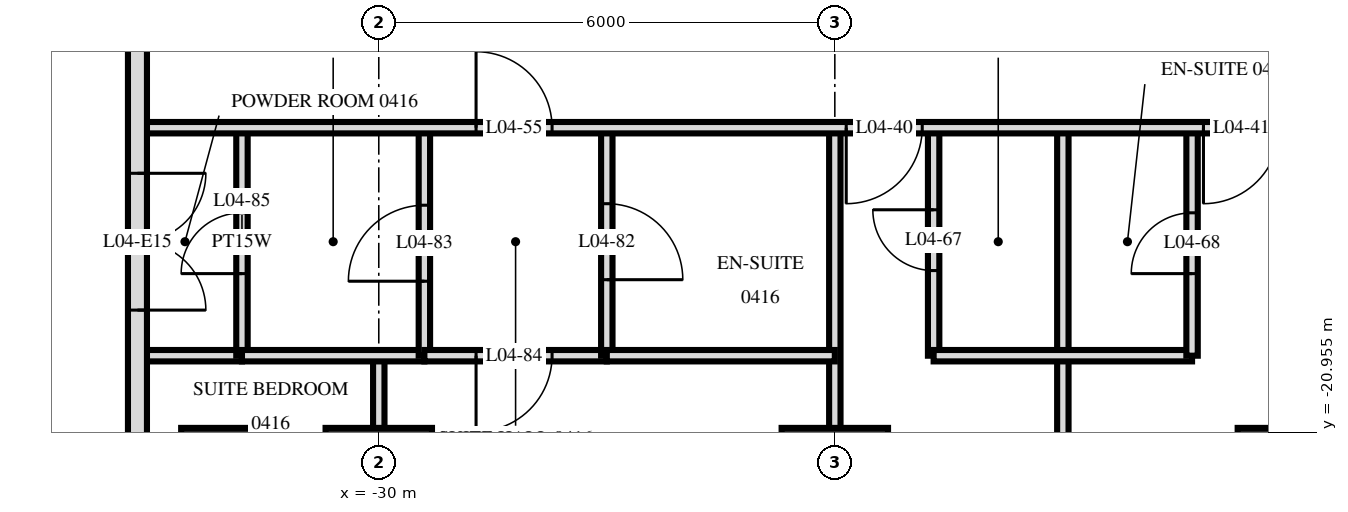
"""IFC4 building model, lengths in metres.
Left out: names, types, materials, properties, quantities, classifications, styles, units other than length and angle.
Written with IfcOpenShell. Run it as: python <this file> out.ifc"""

import sys

from ifc_helpers import new_model, si_unit, direction, frame, frame_2d, origin, origin_2d, place, context, subcontext, project, spatial, rectangle, extrude, element, fill, save


model = new_model("IFC4")
c1 = context("Model", 3, precision=1e-05, world=origin(), true_north=direction((0.0, 1.0)))
c2 = subcontext(c1, "Body", "Model", "MODEL_VIEW")
j1 = project(units=[si_unit("LENGTHUNIT", "METRE"), si_unit("PLANEANGLEUNIT", "RADIAN")], contexts=[c1])
p1 = place(None, origin())
s1 = spatial("IfcSite", under=j1, at=p1, CompositionType="ELEMENT")
p2 = place(p1, origin())
s2 = spatial("IfcBuilding", under=s1, at=p2, CompositionType="ELEMENT")
p3 = place(p2, frame((0.0, 0.0, 24.0)))
s3 = spatial("IfcBuildingStorey", under=s2, at=p3, CompositionType="ELEMENT", Elevation=24.0)
p4 = place(p3, frame((-32.1, -21.6, -0.28), z_axis=(0.0, 0.0, 1.0), x_axis=(0.0, 1.0, 0.0)))
e1 = element("IfcColumn", 1, at=p4, inside=s3, PredefinedType="COLUMN", context=c2, shape_type="SweptSolid", body=[
    extrude(rectangle(XDim=1.4, YDim=1.0, at=origin_2d()), origin(), (0.0, 0.0, 1.0), 3.88),
])
for number, where, z_axis, x_axis in (
    (2, (-30.0, -21.6, -0.28), (0.0, 0.0, 1.0), (1.0, 0.0, 0.0)),
    (3, (-24.0, -21.6, -0.28), (0.0, 0.0, 1.0), (1.0, 0.0, 0.0)),
    (4, (-18.0, -21.6, -0.28), (0.0, 0.0, 1.0), (1.0, 0.0, 0.0)),
):
    element("IfcColumn", number, at=place(p3, frame(where, z_axis=z_axis, x_axis=x_axis)), inside=s3, PredefinedType="COLUMN", context=c2, shape_type="SweptSolid", body=[
        extrude(rectangle(XDim=1.4, YDim=1.4, at=origin_2d()), origin(), (0.0, 0.0, 1.0), 3.88),
    ])
p5 = place(p3, frame((-33.175, -3.325, 0.0), z_axis=(0.0, 0.0, 1.0), x_axis=(0.0, -1.0, 0.0)))
e5 = element("IfcWall", 5, at=p5, inside=s3, PredefinedType="SOLIDWALL", context=c2, shape_type="SweptSolid", body=[
    extrude(rectangle(XDim=21.551, YDim=0.25, at=frame_2d((10.775, 0.0))), origin(), (0.0, 0.0, 1.0), 3.32),
])
p6 = place(p5, frame((7.025, 0.0, 0.0)))
e6 = element("IfcOpeningElement", 6, at=p6, cuts=e5, PredefinedType="OPENING", context=c2, shape_type="SweptSolid", body=[
    extrude(rectangle(XDim=1.8, YDim=2.4, at=frame_2d((0.9, 1.2))), frame((0.0, 0.135, 0.0), z_axis=(0.0, -1.0, 0.0), x_axis=(1.0, 0.0, 0.0)), (0.0, 0.0, 1.0), 0.27),
])
p7 = place(p5, frame((14.225, 0.0, 0.0)))
e7 = element("IfcOpeningElement", 7, at=p7, cuts=e5, PredefinedType="OPENING", context=c2, shape_type="SweptSolid", body=[
    extrude(rectangle(XDim=1.8, YDim=2.4, at=frame_2d((0.9, 1.2))), frame((0.0, 0.135, 0.0), z_axis=(0.0, -1.0, 0.0), x_axis=(1.0, 0.0, 0.0)), (0.0, 0.0, 1.0), 0.27),
])
p8 = place(p5, frame((18.875, 0.0, 0.0)))
e8 = element("IfcOpeningElement", 8, at=p8, cuts=e5, PredefinedType="OPENING", context=c2, shape_type="SweptSolid", body=[
    extrude(rectangle(XDim=1.8, YDim=2.4, at=frame_2d((0.9, 1.2))), frame((0.0, 0.135, 0.0), z_axis=(0.0, -1.0, 0.0), x_axis=(1.0, 0.0, 0.0)), (0.0, 0.0, 1.0), 0.27),
])
p9 = place(p3, frame((-19.3, -19.95, 0.0), z_axis=(0.0, 0.0, 1.0), x_axis=(0.0, 1.0, 0.0)))
e9 = element("IfcWall", 9, at=p9, inside=s3, PredefinedType="PARTITIONING", context=c2, shape_type="SweptSolid", body=[
    extrude(rectangle(XDim=3.0, YDim=0.15, at=frame_2d((1.5, 0.0))), origin(), (0.0, 0.0, 1.0), 3.32),
])
p10 = place(p9, frame((1.08, 0.0, 0.0)))
e10 = element("IfcOpeningElement", 10, at=p10, cuts=e9, PredefinedType="OPENING", context=c2, shape_type="SweptSolid", body=[
    extrude(rectangle(XDim=0.8, YDim=2.1, at=frame_2d((0.4, 1.05))), frame((0.0, 0.085, 0.0), z_axis=(0.0, -1.0, 0.0), x_axis=(1.0, 0.0, 0.0)), (0.0, 0.0, 1.0), 0.17),
])
p11 = place(p3, frame((-21.0, -29.22, 0.0), z_axis=(0.0, 0.0, 1.0), x_axis=(0.0, 1.0, 0.0)))
e11 = element("IfcWall", 11, at=p11, inside=s3, PredefinedType="PARTITIONING", context=c2, shape_type="SweptSolid", body=[
    extrude(rectangle(XDim=12.27, YDim=0.15, at=frame_2d((6.135, 0.0))), origin(), (0.0, 0.0, 1.0), 3.32),
])
p12 = place(p3, frame((-22.7, -19.95, 0.0), z_axis=(0.0, 0.0, 1.0), x_axis=(0.0, 1.0, 0.0)))
e12 = element("IfcWall", 12, at=p12, inside=s3, PredefinedType="PARTITIONING", context=c2, shape_type="SweptSolid", body=[
    extrude(rectangle(XDim=3.0, YDim=0.15, at=frame_2d((1.5, 0.0))), origin(), (0.0, 0.0, 1.0), 3.32),
])
p13 = place(p12, frame((1.12, 0.0, 0.0)))
e13 = element("IfcOpeningElement", 13, at=p13, cuts=e12, PredefinedType="OPENING", context=c2, shape_type="SweptSolid", body=[
    extrude(rectangle(XDim=0.8, YDim=2.1, at=frame_2d((0.4, 1.05))), frame((0.0, 0.085, 0.0), z_axis=(0.0, -1.0, 0.0), x_axis=(1.0, 0.0, 0.0)), (0.0, 0.0, 1.0), 0.17),
])
p14 = place(p3, frame((-24.0, -29.22, 0.0), z_axis=(0.0, 0.0, 1.0), x_axis=(0.0, 1.0, 0.0)))
e14 = element("IfcWall", 14, at=p14, inside=s3, PredefinedType="PARTITIONING", context=c2, shape_type="SweptSolid", body=[
    extrude(rectangle(XDim=12.27, YDim=0.15, at=frame_2d((6.135, 0.0))), origin(), (0.0, 0.0, 1.0), 3.32),
])
p15 = place(p3, frame((-27.0, -19.95, 0.0), z_axis=(0.0, 0.0, 1.0), x_axis=(0.0, 1.0, 0.0)))
e15 = element("IfcWall", 15, at=p15, inside=s3, PredefinedType="PARTITIONING", context=c2, shape_type="SweptSolid", body=[
    extrude(rectangle(XDim=3.0, YDim=0.15, at=frame_2d((1.5, 0.0))), origin(), (0.0, 0.0, 1.0), 3.32),
])
p16 = place(p15, frame((1.0, 0.0, 0.0)))
e16 = element("IfcOpeningElement", 16, at=p16, cuts=e15, PredefinedType="OPENING", context=c2, shape_type="SweptSolid", body=[
    extrude(rectangle(XDim=1.0, YDim=2.1, at=frame_2d((0.5, 1.05))), frame((0.0, 0.085, 0.0), z_axis=(0.0, -1.0, 0.0), x_axis=(1.0, 0.0, 0.0)), (0.0, 0.0, 1.0), 0.17),
])
p17 = place(p3, frame((-29.4, -19.95, 0.0), z_axis=(0.0, 0.0, 1.0), x_axis=(0.0, 1.0, 0.0)))
e17 = element("IfcWall", 17, at=p17, inside=s3, PredefinedType="PARTITIONING", context=c2, shape_type="SweptSolid", body=[
    extrude(rectangle(XDim=3.0, YDim=0.15, at=frame_2d((1.5, 0.0))), origin(), (0.0, 0.0, 1.0), 3.32),
])
p18 = place(p17, frame((0.98, 0.0, 0.0)))
e18 = element("IfcOpeningElement", 18, at=p18, cuts=e17, PredefinedType="OPENING", context=c2, shape_type="SweptSolid", body=[
    extrude(rectangle(XDim=1.0, YDim=2.1, at=frame_2d((0.5, 1.05))), frame((0.0, 0.085, 0.0), z_axis=(0.0, -1.0, 0.0), x_axis=(1.0, 0.0, 0.0)), (0.0, 0.0, 1.0), 0.17),
])
p19 = place(p3, frame((-30.0, -28.978, 0.0), z_axis=(0.0, 0.0, 1.0), x_axis=(0.0, 1.0, 0.0)))
e19 = element("IfcWall", 19, at=p19, inside=s3, PredefinedType="PARTITIONING", context=c2, shape_type="SweptSolid", body=[
    extrude(rectangle(XDim=9.028, YDim=0.15, at=frame_2d((4.514, 0.0))), origin(), (0.0, 0.0, 1.0), 3.32),
])
p20 = place(p19, frame((3.987, 0.0, 0.0)))
e20 = element("IfcOpeningElement", 20, at=p20, cuts=e19, PredefinedType="OPENING", context=c2, shape_type="SweptSolid", body=[
    extrude(rectangle(XDim=0.9, YDim=2.1, at=frame_2d((0.45, 1.05))), frame((0.0, 0.085, 0.0), z_axis=(0.0, -1.0, 0.0), x_axis=(1.0, 0.0, 0.0)), (0.0, 0.0, 1.0), 0.17),
])
p21 = place(p3, frame((-31.8, -19.95, 0.0), z_axis=(0.0, 0.0, 1.0), x_axis=(0.0, 1.0, 0.0)))
e21 = element("IfcWall", 21, at=p21, inside=s3, PredefinedType="PLUMBINGWALL", context=c2, shape_type="SweptSolid", body=[
    extrude(rectangle(XDim=3.0, YDim=0.15, at=frame_2d((1.5, 0.0))), origin(), (0.0, 0.0, 1.0), 3.32),
])
p22 = place(p21, frame((1.08, 0.0, 0.0)))
e22 = element("IfcOpeningElement", 22, at=p22, cuts=e21, PredefinedType="OPENING", context=c2, shape_type="SweptSolid", body=[
    extrude(rectangle(XDim=0.8, YDim=2.1, at=frame_2d((0.4, 1.05))), frame((0.0, 0.085, 0.0), z_axis=(0.0, -1.0, 0.0), x_axis=(1.0, 0.0, 0.0)), (0.0, 0.0, 1.0), 0.17),
])
p23 = place(p3, frame((-29.4, -19.95, 0.0), z_axis=(0.0, 0.0, 1.0), x_axis=(1.0, 0.0, 0.0)))
e23 = element("IfcWall", 23, at=p23, inside=s3, PredefinedType="PARTITIONING", context=c2, shape_type="SweptSolid", body=[
    extrude(rectangle(XDim=2.4, YDim=0.15, at=frame_2d((1.2, 0.0))), origin(), (0.0, 0.0, 1.0), 3.32),
])
p24 = place(p23, frame((0.68, 0.0, 0.0)))
e24 = element("IfcOpeningElement", 24, at=p24, cuts=e23, PredefinedType="OPENING", context=c2, shape_type="SweptSolid", body=[
    extrude(rectangle(XDim=1.0, YDim=2.1, at=frame_2d((0.5, 1.05))), frame((0.0, 0.085, 0.0), z_axis=(0.0, -1.0, 0.0), x_axis=(1.0, 0.0, 0.0)), (0.0, 0.0, 1.0), 0.17),
])
p25 = place(p3, frame((-31.8, -19.95, 0.0), z_axis=(0.0, 0.0, 1.0), x_axis=(1.0, 0.0, 0.0)))
e25 = element("IfcWall", 25, at=p25, inside=s3, PredefinedType="PARTITIONING", context=c2, shape_type="SweptSolid", body=[
    extrude(rectangle(XDim=2.4, YDim=0.15, at=frame_2d((1.2, 0.0))), origin(), (0.0, 0.0, 1.0), 3.32),
])
p26 = place(p3, frame((-27.0, -19.95, 0.0), z_axis=(0.0, 0.0, 1.0), x_axis=(1.0, 0.0, 0.0)))
e26 = element("IfcWall", 26, at=p26, inside=s3, PredefinedType="PARTITIONING", context=c2, shape_type="SweptSolid", body=[
    extrude(rectangle(XDim=3.0, YDim=0.15, at=frame_2d((1.5, 0.0))), origin(), (0.0, 0.0, 1.0), 3.32),
])
p27 = place(p3, frame((-22.7, -19.95, 0.0), z_axis=(0.0, 0.0, 1.0), x_axis=(1.0, 0.0, 0.0)))
e27 = element("IfcWall", 27, at=p27, inside=s3, PredefinedType="PARTITIONING", context=c2, shape_type="SweptSolid", body=[
    extrude(rectangle(XDim=3.4, YDim=0.15, at=frame_2d((1.7, 0.0))), origin(), (0.0, 0.0, 1.0), 3.32),
])
p28 = place(p3, frame((-33.12, -19.95, 0.0), z_axis=(0.0, 0.0, 1.0), x_axis=(1.0, 0.0, 0.0)))
e28 = element("IfcWall", 28, at=p28, inside=s3, PredefinedType="PLUMBINGWALL", context=c2, shape_type="SweptSolid", body=[
    extrude(rectangle(XDim=1.32, YDim=0.15, at=frame_2d((0.66, 0.0))), origin(), (0.0, 0.0, 1.0), 3.32),
])
p29 = place(p3, frame((-33.12, -16.95, 0.0), z_axis=(0.0, 0.0, 1.0), x_axis=(1.0, 0.0, 0.0)))
e29 = element("IfcWall", 29, at=p29, inside=s3, PredefinedType="PARTITIONING", context=c2, shape_type="SweptSolid", body=[
    extrude(rectangle(XDim=66.24, YDim=0.15, at=frame_2d((33.12, 0.0))), origin(), (0.0, 0.0, 1.0), 3.32),
])
p30 = place(p29, frame((9.27, 0.0, 0.0)))
e30 = element("IfcOpeningElement", 30, at=p30, cuts=e29, PredefinedType="OPENING", context=c2, shape_type="SweptSolid", body=[
    extrude(rectangle(XDim=1.0, YDim=2.1, at=frame_2d((0.5, 1.05))), frame((0.0, 0.085, 0.0), z_axis=(0.0, -1.0, 0.0), x_axis=(1.0, 0.0, 0.0)), (0.0, 0.0, 1.0), 0.17),
])
p31 = place(p29, frame((13.97, 0.0, 0.0)))
e31 = element("IfcOpeningElement", 31, at=p31, cuts=e29, PredefinedType="OPENING", context=c2, shape_type="SweptSolid", body=[
    extrude(rectangle(XDim=1.0, YDim=2.1, at=frame_2d((0.5, 1.05))), frame((0.0, 0.085, 0.0), z_axis=(0.0, -1.0, 0.0), x_axis=(1.0, 0.0, 0.0)), (0.0, 0.0, 1.0), 0.17),
])
p32 = place(p29, frame((15.27, 0.0, 0.0)))
e32 = element("IfcOpeningElement", 32, at=p32, cuts=e29, PredefinedType="OPENING", context=c2, shape_type="SweptSolid", body=[
    extrude(rectangle(XDim=1.0, YDim=2.1, at=frame_2d((0.5, 1.05))), frame((0.0, 0.085, 0.0), z_axis=(0.0, -1.0, 0.0), x_axis=(1.0, 0.0, 0.0)), (0.0, 0.0, 1.0), 0.17),
])
p33 = place(p29, frame((19.97, 0.0, 0.0)))
e33 = element("IfcOpeningElement", 33, at=p33, cuts=e29, PredefinedType="OPENING", context=c2, shape_type="SweptSolid", body=[
    extrude(rectangle(XDim=1.0, YDim=2.1, at=frame_2d((0.5, 1.05))), frame((0.0, 0.085, 0.0), z_axis=(0.0, -1.0, 0.0), x_axis=(1.0, 0.0, 0.0)), (0.0, 0.0, 1.0), 0.17),
])
p34 = place(p29, frame((22.27, 0.0, 0.0)))
e34 = element("IfcOpeningElement", 34, at=p34, cuts=e29, PredefinedType="OPENING", context=c2, shape_type="SweptSolid", body=[
    extrude(rectangle(XDim=1.0, YDim=2.1, at=frame_2d((0.5, 1.05))), frame((0.0, 0.085, 0.0), z_axis=(0.0, -1.0, 0.0), x_axis=(1.0, 0.0, 0.0)), (0.0, 0.0, 1.0), 0.17),
])
p35 = place(p29, frame((28.97, 0.0, 0.0)))
e35 = element("IfcOpeningElement", 35, at=p35, cuts=e29, PredefinedType="OPENING", context=c2, shape_type="SweptSolid", body=[
    extrude(rectangle(XDim=1.0, YDim=2.1, at=frame_2d((0.5, 1.05))), frame((0.0, 0.085, 0.0), z_axis=(0.0, -1.0, 0.0), x_axis=(1.0, 0.0, 0.0)), (0.0, 0.0, 1.0), 0.17),
])
p36 = place(p29, frame((30.27, 0.0, 0.0)))
e36 = element("IfcOpeningElement", 36, at=p36, cuts=e29, PredefinedType="OPENING", context=c2, shape_type="SweptSolid", body=[
    extrude(rectangle(XDim=1.0, YDim=2.1, at=frame_2d((0.5, 1.05))), frame((0.0, 0.085, 0.0), z_axis=(0.0, -1.0, 0.0), x_axis=(1.0, 0.0, 0.0)), (0.0, 0.0, 1.0), 0.17),
])
p37 = place(p29, frame((34.97, 0.0, 0.0)))
e37 = element("IfcOpeningElement", 37, at=p37, cuts=e29, PredefinedType="OPENING", context=c2, shape_type="SweptSolid", body=[
    extrude(rectangle(XDim=1.0, YDim=2.1, at=frame_2d((0.5, 1.05))), frame((0.0, 0.085, 0.0), z_axis=(0.0, -1.0, 0.0), x_axis=(1.0, 0.0, 0.0)), (0.0, 0.0, 1.0), 0.17),
])
p38 = place(p29, frame((36.27, 0.0, 0.0)))
e38 = element("IfcOpeningElement", 38, at=p38, cuts=e29, PredefinedType="OPENING", context=c2, shape_type="SweptSolid", body=[
    extrude(rectangle(XDim=1.0, YDim=2.1, at=frame_2d((0.5, 1.05))), frame((0.0, 0.085, 0.0), z_axis=(0.0, -1.0, 0.0), x_axis=(1.0, 0.0, 0.0)), (0.0, 0.0, 1.0), 0.17),
])
p39 = place(p29, frame((40.97, 0.0, 0.0)))
e39 = element("IfcOpeningElement", 39, at=p39, cuts=e29, PredefinedType="OPENING", context=c2, shape_type="SweptSolid", body=[
    extrude(rectangle(XDim=1.0, YDim=2.1, at=frame_2d((0.5, 1.05))), frame((0.0, 0.085, 0.0), z_axis=(0.0, -1.0, 0.0), x_axis=(1.0, 0.0, 0.0)), (0.0, 0.0, 1.0), 0.17),
])
p40 = place(p29, frame((42.27, 0.0, 0.0)))
e40 = element("IfcOpeningElement", 40, at=p40, cuts=e29, PredefinedType="OPENING", context=c2, shape_type="SweptSolid", body=[
    extrude(rectangle(XDim=1.0, YDim=2.1, at=frame_2d((0.5, 1.05))), frame((0.0, 0.085, 0.0), z_axis=(0.0, -1.0, 0.0), x_axis=(1.0, 0.0, 0.0)), (0.0, 0.0, 1.0), 0.17),
])
p41 = place(p29, frame((46.97, 0.0, 0.0)))
e41 = element("IfcOpeningElement", 41, at=p41, cuts=e29, PredefinedType="OPENING", context=c2, shape_type="SweptSolid", body=[
    extrude(rectangle(XDim=1.0, YDim=2.1, at=frame_2d((0.5, 1.05))), frame((0.0, 0.085, 0.0), z_axis=(0.0, -1.0, 0.0), x_axis=(1.0, 0.0, 0.0)), (0.0, 0.0, 1.0), 0.17),
])
p42 = place(p29, frame((48.27, 0.0, 0.0)))
e42 = element("IfcOpeningElement", 42, at=p42, cuts=e29, PredefinedType="OPENING", context=c2, shape_type="SweptSolid", body=[
    extrude(rectangle(XDim=1.0, YDim=2.1, at=frame_2d((0.5, 1.05))), frame((0.0, 0.085, 0.0), z_axis=(0.0, -1.0, 0.0), x_axis=(1.0, 0.0, 0.0)), (0.0, 0.0, 1.0), 0.17),
])
p43 = place(p29, frame((52.97, 0.0, 0.0)))
e43 = element("IfcOpeningElement", 43, at=p43, cuts=e29, PredefinedType="OPENING", context=c2, shape_type="SweptSolid", body=[
    extrude(rectangle(XDim=1.0, YDim=2.1, at=frame_2d((0.5, 1.05))), frame((0.0, 0.085, 0.0), z_axis=(0.0, -1.0, 0.0), x_axis=(1.0, 0.0, 0.0)), (0.0, 0.0, 1.0), 0.17),
])
p44 = place(p29, frame((54.27, 0.0, 0.0)))
e44 = element("IfcOpeningElement", 44, at=p44, cuts=e29, PredefinedType="OPENING", context=c2, shape_type="SweptSolid", body=[
    extrude(rectangle(XDim=1.0, YDim=2.1, at=frame_2d((0.5, 1.05))), frame((0.0, 0.085, 0.0), z_axis=(0.0, -1.0, 0.0), x_axis=(1.0, 0.0, 0.0)), (0.0, 0.0, 1.0), 0.17),
])
p45 = place(p29, frame((4.4, 0.0, 0.0)))
e45 = element("IfcOpeningElement", 45, at=p45, cuts=e29, PredefinedType="OPENING", context=c2, shape_type="SweptSolid", body=[
    extrude(rectangle(XDim=1.0, YDim=2.1, at=frame_2d((0.5, 1.05))), frame((0.0, 0.085, 0.0), z_axis=(0.0, -1.0, 0.0), x_axis=(1.0, 0.0, 0.0)), (0.0, 0.0, 1.0), 0.17),
])
p46 = place(p29, frame((60.8, 0.0, 0.0)))
e46 = element("IfcOpeningElement", 46, at=p46, cuts=e29, PredefinedType="OPENING", context=c2, shape_type="SweptSolid", body=[
    extrude(rectangle(XDim=1.0, YDim=2.1, at=frame_2d((0.5, 1.05))), frame((0.0, 0.085, 0.0), z_axis=(0.0, -1.0, 0.0), x_axis=(1.0, 0.0, 0.0)), (0.0, 0.0, 1.0), 0.17),
])
p47 = place(p7, origin())
e47 = element("IfcDoor", 47, at=p47, inside=s3, OperationType="DOUBLE_DOOR_SINGLE_SWING", PredefinedType="DOOR", context=c2, shape_type="SweptSolid", body=[
    extrude(rectangle(XDim=1.8, YDim=2.4, at=frame_2d((0.9, 1.2))), frame((0.0, 0.025, 0.0), z_axis=(0.0, -1.0, 0.0), x_axis=(1.0, 0.0, 0.0)), (0.0, 0.0, 1.0), 0.05),
])
fill(e7, e47)
p48 = place(p30, frame((0.5, 0.0, 0.0), z_axis=(0.0, 0.0, 1.0), x_axis=(-1.0, 0.0, 0.0)))
e48 = element("IfcDoor", 48, at=p48, inside=s3, OperationType="SINGLE_SWING_LEFT", PredefinedType="DOOR", context=c2, shape_type="SweptSolid", body=[
    extrude(rectangle(XDim=1.0, YDim=2.1, at=frame_2d((0.0, 1.05))), frame((0.0, -0.025, 0.0), z_axis=(0.0, 1.0, 0.0), x_axis=(-1.0, 0.0, 0.0)), (0.0, 0.0, 1.0), 0.05),
])
fill(e30, e48)
p49 = place(p31, frame((0.5, 0.0, 0.0), z_axis=(0.0, 0.0, 1.0), x_axis=(-1.0, 0.0, 0.0)))
e49 = element("IfcDoor", 49, at=p49, inside=s3, OperationType="SINGLE_SWING_LEFT", PredefinedType="DOOR", context=c2, shape_type="SweptSolid", body=[
    extrude(rectangle(XDim=1.0, YDim=2.1, at=frame_2d((0.0, 1.05))), frame((0.0, -0.025, 0.0), z_axis=(0.0, 1.0, 0.0), x_axis=(-1.0, 0.0, 0.0)), (0.0, 0.0, 1.0), 0.05),
])
fill(e31, e49)
p50 = place(p45, origin())
e50 = element("IfcDoor", 50, at=p50, inside=s3, OperationType="SINGLE_SWING_RIGHT", PredefinedType="DOOR", context=c2, shape_type="SweptSolid", body=[
    extrude(rectangle(XDim=1.0, YDim=2.1, at=frame_2d((0.5, 1.05))), frame((0.0, 0.025, 0.0), z_axis=(0.0, -1.0, 0.0), x_axis=(1.0, 0.0, 0.0)), (0.0, 0.0, 1.0), 0.05),
])
fill(e45, e50)
p51 = place(p13, origin())
e51 = element("IfcDoor", 51, at=p51, inside=s3, OperationType="SINGLE_SWING_LEFT", PredefinedType="DOOR", context=c2, shape_type="SweptSolid", body=[
    extrude(rectangle(XDim=0.8, YDim=2.1, at=frame_2d((0.4, 1.05))), frame((0.0, 0.025, 0.0), z_axis=(0.0, -1.0, 0.0), x_axis=(1.0, 0.0, 0.0)), (0.0, 0.0, 1.0), 0.05),
])
fill(e13, e51)
p52 = place(p10, origin())
e52 = element("IfcDoor", 52, at=p52, inside=s3, OperationType="SINGLE_SWING_RIGHT", PredefinedType="DOOR", context=c2, shape_type="SweptSolid", body=[
    extrude(rectangle(XDim=0.8, YDim=2.1, at=frame_2d((0.4, 1.05))), frame((0.0, 0.025, 0.0), z_axis=(0.0, -1.0, 0.0), x_axis=(1.0, 0.0, 0.0)), (0.0, 0.0, 1.0), 0.05),
])
fill(e10, e52)
p53 = place(p16, frame((0.5, 0.0, 0.0), z_axis=(0.0, 0.0, 1.0), x_axis=(-1.0, 0.0, 0.0)))
e53 = element("IfcDoor", 53, at=p53, inside=s3, OperationType="SINGLE_SWING_LEFT", PredefinedType="DOOR", context=c2, shape_type="SweptSolid", body=[
    extrude(rectangle(XDim=1.0, YDim=2.1, at=frame_2d((0.0, 1.05))), frame((0.0, -0.025, 0.0), z_axis=(0.0, 1.0, 0.0), x_axis=(-1.0, 0.0, 0.0)), (0.0, 0.0, 1.0), 0.05),
])
fill(e16, e53)
p54 = place(p18, origin())
e54 = element("IfcDoor", 54, at=p54, inside=s3, OperationType="SINGLE_SWING_RIGHT", PredefinedType="DOOR", context=c2, shape_type="SweptSolid", body=[
    extrude(rectangle(XDim=1.0, YDim=2.1, at=frame_2d((0.5, 1.05))), frame((0.0, 0.025, 0.0), z_axis=(0.0, -1.0, 0.0), x_axis=(1.0, 0.0, 0.0)), (0.0, 0.0, 1.0), 0.05),
])
fill(e18, e54)
p55 = place(p24, frame((0.5, 0.0, 0.0), z_axis=(0.0, 0.0, 1.0), x_axis=(-1.0, 0.0, 0.0)))
e55 = element("IfcDoor", 55, at=p55, inside=s3, OperationType="SINGLE_SWING_LEFT", PredefinedType="DOOR", context=c2, shape_type="SweptSolid", body=[
    extrude(rectangle(XDim=1.0, YDim=2.1, at=frame_2d((0.0, 1.05))), frame((0.0, -0.025, 0.0), z_axis=(0.0, 1.0, 0.0), x_axis=(-1.0, 0.0, 0.0)), (0.0, 0.0, 1.0), 0.05),
])
fill(e24, e55)
p56 = place(p22, origin())
e56 = element("IfcDoor", 56, at=p56, inside=s3, OperationType="SINGLE_SWING_RIGHT", PredefinedType="DOOR", context=c2, shape_type="SweptSolid", body=[
    extrude(rectangle(XDim=0.8, YDim=2.1, at=frame_2d((0.4, 1.05))), frame((0.0, 0.025, 0.0), z_axis=(0.0, -1.0, 0.0), x_axis=(1.0, 0.0, 0.0)), (0.0, 0.0, 1.0), 0.05),
])
fill(e22, e56)
save(model, sys.argv[1])
